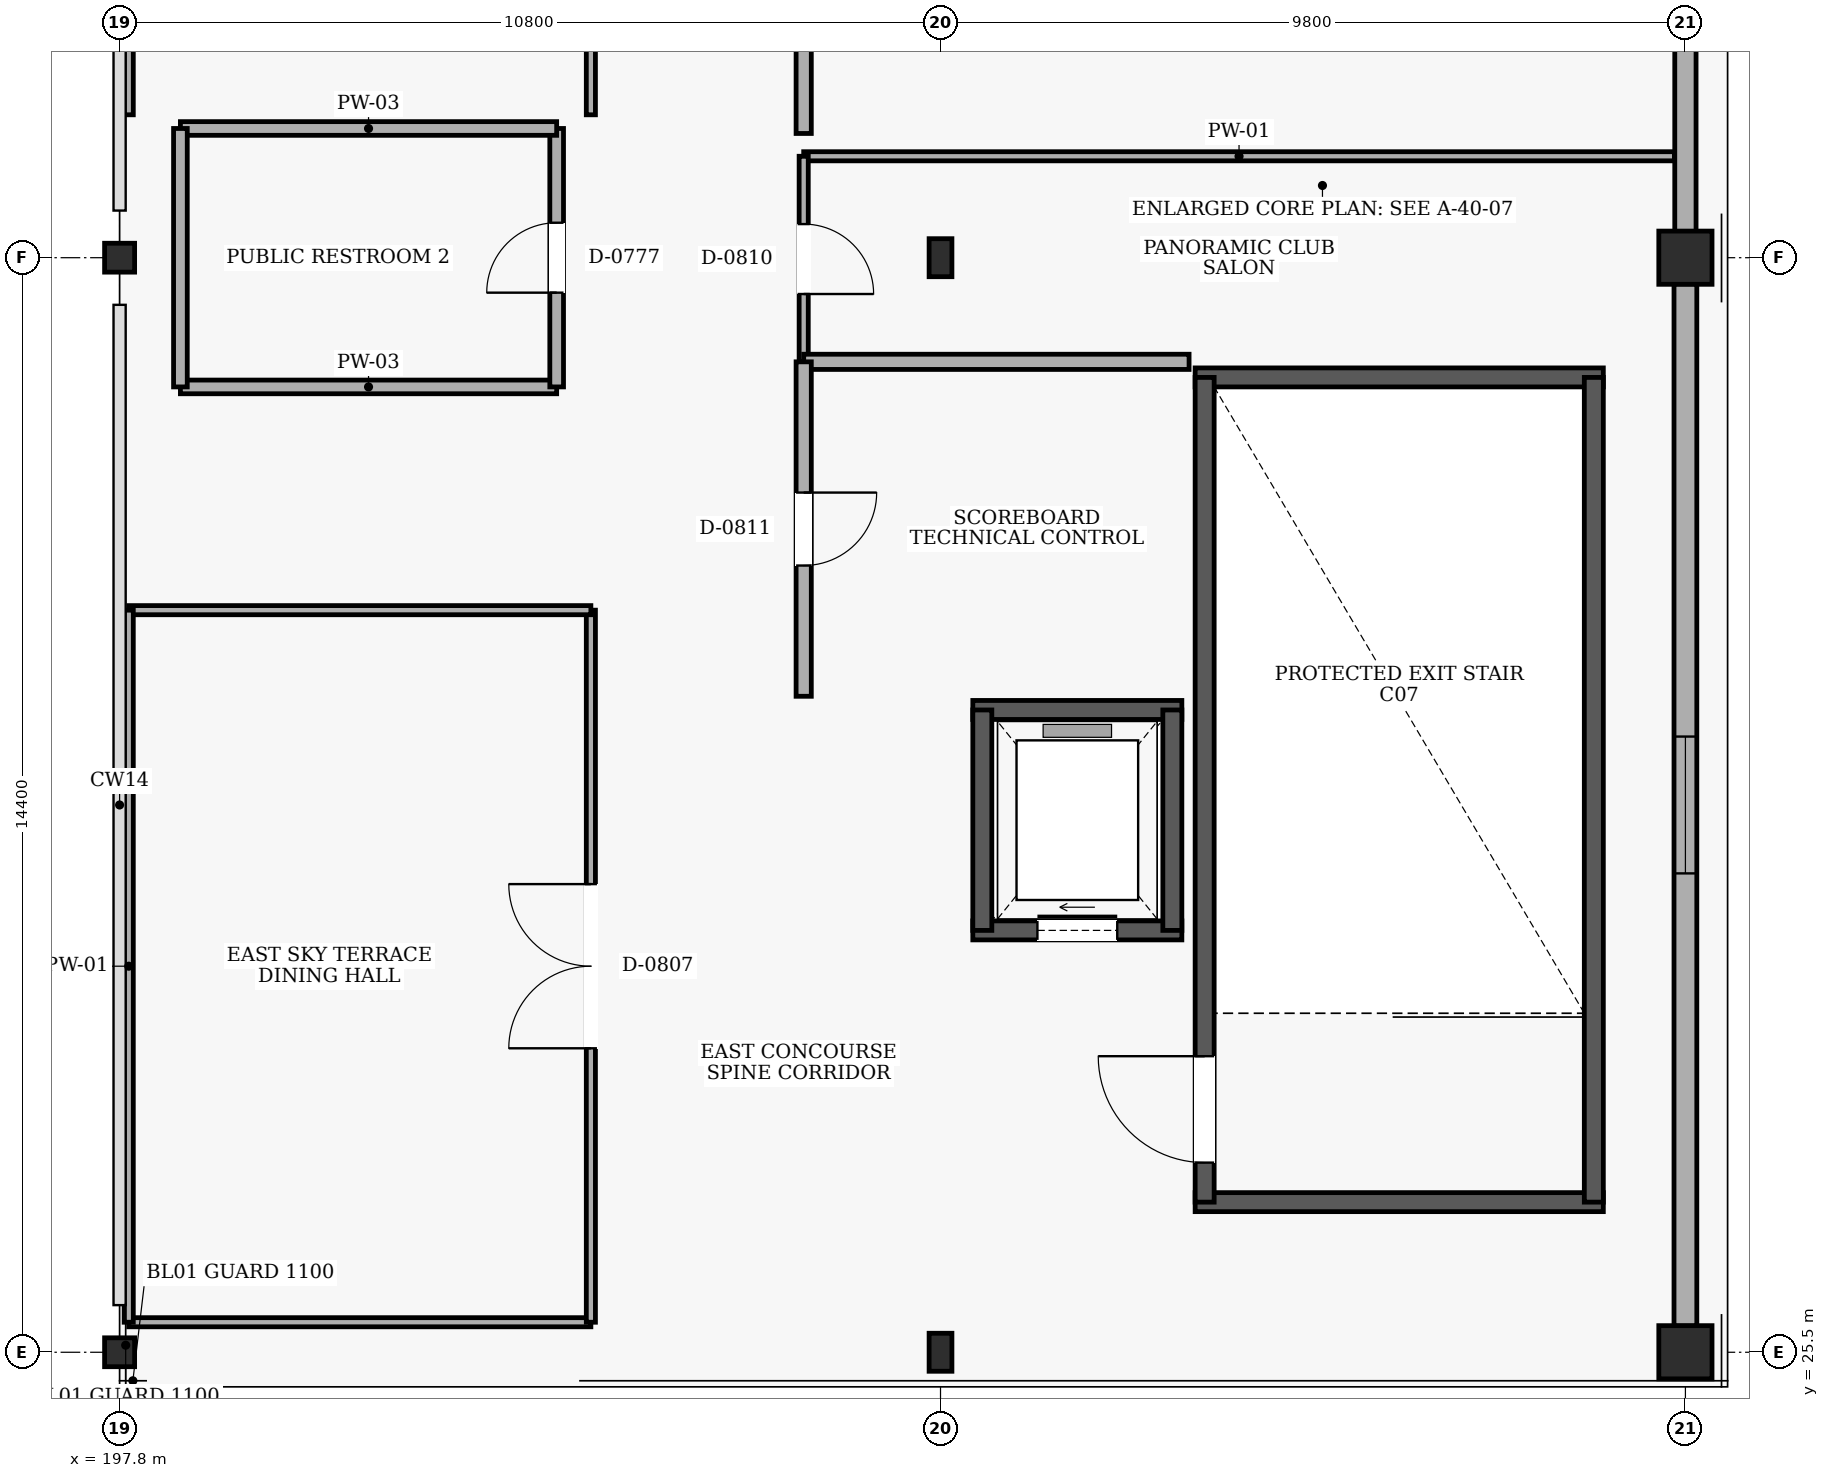
"""IFC4 building model, lengths in metres.
Left out: names, types, materials, properties, quantities, classifications, styles, units other than length and angle.
Written with IfcOpenShell. Run it as: python <this file> out.ifc"""

import sys

from ifc_helpers import new_model, si_unit, direction, frame, frame_2d, origin, origin_2d, place, context, subcontext, project, spatial, rectangle, i_section, extrude, element, fill, save


model = new_model("IFC4")
c1 = context("Model", 3, precision=1e-05, world=origin(), true_north=direction((0.0, 1.0)))
c2 = subcontext(c1, "Body", "Model", "MODEL_VIEW")
j1 = project(units=[si_unit("LENGTHUNIT", "METRE"), si_unit("PLANEANGLEUNIT", "RADIAN")], contexts=[c1])
p1 = place(None, origin())
s1 = spatial("IfcSite", under=j1, at=p1, CompositionType="ELEMENT")
p2 = place(p1, origin())
s2 = spatial("IfcBuilding", under=s1, at=p2, CompositionType="ELEMENT")
p3 = place(p2, frame((0.0, 0.0, 24.6)))
s3 = spatial("IfcBuildingStorey", under=s2, at=p3, CompositionType="ELEMENT", Elevation=24.6)
for number, where, z_axis, x_axis in (
    (1, (197.8, 25.5, 0.0), (0.0, 0.0, 1.0), (1.0, 0.0, 0.0)),
    (2, (197.8, 39.9, 0.0), (0.0, 0.0, 1.0), (1.0, 0.0, 0.0)),
):
    element("IfcColumn", number, at=place(p3, frame(where, z_axis=z_axis, x_axis=x_axis)), inside=s3, PredefinedType="COLUMN", context=c2, shape_type="SweptSolid", body=[
        extrude(i_section(OverallWidth=0.395, OverallDepth=0.38, WebThickness=0.019, FlangeThickness=0.03, at=origin_2d()), origin(), (0.0, 0.0, 1.0), 4.8),
    ])
for number, where, z_axis, x_axis in (
    (3, (208.6, 25.5, 0.0), (0.0, 0.0, 1.0), (1.0, 0.0, 0.0)),
    (4, (208.6, 39.9, 0.0), (0.0, 0.0, 1.0), (1.0, 0.0, 0.0)),
):
    element("IfcColumn", number, at=place(p3, frame(where, z_axis=z_axis, x_axis=x_axis)), inside=s3, PredefinedType="COLUMN", context=c2, shape_type="SweptSolid", body=[
        extrude(i_section(OverallWidth=0.3, OverallDepth=0.5, WebThickness=0.014, FlangeThickness=0.028, at=origin_2d()), origin(), (0.0, 0.0, 1.0), 4.8),
    ])
for number, where, z_axis, x_axis in (
    (5, (218.4, 25.5, 0.0), (0.0, 0.0, 1.0), (1.0, 0.0, 0.0)),
    (6, (218.4, 39.9, 0.0), (0.0, 0.0, 1.0), (1.0, 0.0, 0.0)),
):
    element("IfcColumn", number, at=place(p3, frame(where, z_axis=z_axis, x_axis=x_axis)), inside=s3, PredefinedType="COLUMN", context=c2, shape_type="SweptSolid", body=[
        extrude(rectangle(XDim=0.7, YDim=0.7, at=origin_2d()), origin(), (0.0, 0.0, 1.0), 4.8),
    ])
p4 = place(p3, frame((218.4, 46.755, 0.0), z_axis=(0.0, 0.0, 1.0), x_axis=(0.0, -1.0, 0.0)))
e7 = element("IfcWall", 7, at=p4, inside=s3, PredefinedType="SOLIDWALL", context=c2, shape_type="SweptSolid", body=[
    extrude(rectangle(XDim=6.51, YDim=0.28, at=frame_2d((3.255, 0.0))), origin(), (0.0, 0.0, 1.0), 3.88),
])
p5 = place(p4, frame((2.455, 0.0, 0.9)))
e8 = element("IfcOpeningElement", 8, at=p5, cuts=e7, PredefinedType="OPENING", context=c2, shape_type="SweptSolid", body=[
    extrude(rectangle(XDim=1.6, YDim=1.5, at=frame_2d((0.8, 0.75))), frame((0.0, 0.15, 0.0), z_axis=(0.0, -1.0, 0.0), x_axis=(1.0, 0.0, 0.0)), (0.0, 0.0, 1.0), 0.3),
])
p6 = place(p3, frame((218.4, 39.555, 0.0), z_axis=(0.0, 0.0, 1.0), x_axis=(0.0, -1.0, 0.0)))
e9 = element("IfcWall", 9, at=p6, inside=s3, PredefinedType="SOLIDWALL", context=c2, shape_type="SweptSolid", body=[
    extrude(rectangle(XDim=13.71, YDim=0.3, at=frame_2d((6.855, 0.0))), origin(), (0.0, 0.0, 1.0), 3.58),
])
p7 = place(p6, frame((5.955, 0.0, 0.9)))
e10 = element("IfcOpeningElement", 10, at=p7, cuts=e9, PredefinedType="OPENING", context=c2, shape_type="SweptSolid", body=[
    extrude(rectangle(XDim=1.8, YDim=1.5, at=frame_2d((0.9, 0.75))), frame((0.0, 0.16, 0.0), z_axis=(0.0, -1.0, 0.0), x_axis=(1.0, 0.0, 0.0)), (0.0, 0.0, 1.0), 0.32),
])
for number, where, z_axis, x_axis in (
    (11, (211.95, 27.475, 0.0), (0.0, 0.0, 1.0), (1.0, 0.0, 0.0)),
    (12, (217.32, 38.325, 0.0), (0.0, 0.0, 1.0), (-1.0, 0.0, 0.0)),
):
    element("IfcWall", number, at=place(p3, frame(where, z_axis=z_axis, x_axis=x_axis)), inside=s3, PredefinedType="SHEAR", context=c2, shape_type="SweptSolid", body=[
        extrude(rectangle(XDim=5.37, YDim=0.25, at=frame_2d((2.685, 0.0))), origin(), (0.0, 0.0, 1.0), 4.5),
    ])
p8 = place(p3, frame((212.075, 27.475, 0.0), z_axis=(0.0, 0.0, 1.0), x_axis=(0.0, 1.0, 0.0)))
e13 = element("IfcWall", 13, at=p8, inside=s3, PredefinedType="SHEAR", context=c2, shape_type="SweptSolid", body=[
    extrude(rectangle(XDim=10.85, YDim=0.25, at=frame_2d((5.425, 0.0))), origin(), (0.0, 0.0, 1.0), 4.5),
])
p9 = place(p8, frame((0.52, 0.0, 0.0)))
e14 = element("IfcOpeningElement", 14, at=p9, cuts=e13, PredefinedType="OPENING", context=c2, shape_type="SweptSolid", body=[
    extrude(rectangle(XDim=1.4, YDim=2.15, at=frame_2d((0.7, 1.075))), frame((0.0, 0.135, 0.0), z_axis=(0.0, -1.0, 0.0), x_axis=(1.0, 0.0, 0.0)), (0.0, 0.0, 1.0), 0.27),
])
p10 = place(p3, frame((217.195, 27.475, 0.0), z_axis=(0.0, 0.0, 1.0), x_axis=(0.0, 1.0, 0.0)))
e15 = element("IfcWall", 15, at=p10, inside=s3, PredefinedType="SHEAR", context=c2, shape_type="SweptSolid", body=[
    extrude(rectangle(XDim=10.85, YDim=0.25, at=frame_2d((5.425, 0.0))), origin(), (0.0, 0.0, 1.0), 4.5),
])
p11 = place(p3, frame((209.025, 31.05, 0.0), z_axis=(0.0, 0.0, 1.0), x_axis=(1.0, 0.0, 0.0)))
e16 = element("IfcWall", 16, at=p11, inside=s3, PredefinedType="SHEAR", context=c2, shape_type="SweptSolid", body=[
    extrude(rectangle(XDim=2.75, YDim=0.25, at=frame_2d((1.375, 0.0))), origin(), (0.0, 0.0, 1.0), 4.5),
])
p12 = place(p11, frame((0.85, 0.0, 0.0)))
e17 = element("IfcOpeningElement", 17, at=p12, cuts=e16, PredefinedType="OPENING", context=c2, shape_type="SweptSolid", body=[
    extrude(rectangle(XDim=1.05, YDim=2.15, at=frame_2d((0.525, 1.075))), frame((0.0, 0.135, 0.0), z_axis=(0.0, -1.0, 0.0), x_axis=(1.0, 0.0, 0.0)), (0.0, 0.0, 1.0), 0.27),
])
p13 = place(p3, frame((211.775, 33.95, 0.0), z_axis=(0.0, 0.0, 1.0), x_axis=(-1.0, 0.0, 0.0)))
e18 = element("IfcWall", 18, at=p13, inside=s3, PredefinedType="SHEAR", context=c2, shape_type="SweptSolid", body=[
    extrude(rectangle(XDim=2.75, YDim=0.25, at=frame_2d((1.375, 0.0))), origin(), (0.0, 0.0, 1.0), 4.5),
])
for number, where, z_axis, x_axis in (
    (19, (209.15, 33.95, 0.0), (0.0, 0.0, 1.0), (0.0, -1.0, 0.0)),
    (20, (211.65, 31.05, 0.0), (0.0, 0.0, 1.0), (0.0, 1.0, 0.0)),
):
    element("IfcWall", number, at=place(p3, frame(where, z_axis=z_axis, x_axis=x_axis)), inside=s3, PredefinedType="SHEAR", context=c2, shape_type="SweptSolid", body=[
        extrude(rectangle(XDim=2.9, YDim=0.25, at=frame_2d((1.45, 0.0))), origin(), (0.0, 0.0, 1.0), 4.5),
    ])
p14 = place(p3, frame((198.6, 38.2, 0.0), z_axis=(0.0, 0.0, 1.0), x_axis=(1.0, 0.0, 0.0)))
e21 = element("IfcWall", 21, at=p14, inside=s3, PredefinedType="PARTITIONING", context=c2, shape_type="SweptSolid", body=[
    extrude(rectangle(XDim=4.95, YDim=0.18, at=frame_2d((2.475, 0.0))), origin(), (0.0, 0.0, 1.0), 4.5),
])
p15 = place(p3, frame((203.55, 38.2, 0.0), z_axis=(0.0, 0.0, 1.0), x_axis=(0.0, 1.0, 0.0)))
e22 = element("IfcWall", 22, at=p15, inside=s3, PredefinedType="PARTITIONING", context=c2, shape_type="SweptSolid", body=[
    extrude(rectangle(XDim=3.4, YDim=0.18, at=frame_2d((1.7, 0.0))), origin(), (0.0, 0.0, 1.0), 4.5),
])
p16 = place(p15, frame((1.24, 0.0, 0.0)))
e23 = element("IfcOpeningElement", 23, at=p16, cuts=e22, PredefinedType="OPENING", context=c2, shape_type="SweptSolid", body=[
    extrude(rectangle(XDim=0.92, YDim=2.1, at=frame_2d((0.46, 1.05))), frame((0.0, 0.1, 0.0), z_axis=(0.0, -1.0, 0.0), x_axis=(1.0, 0.0, 0.0)), (0.0, 0.0, 1.0), 0.2),
])
p17 = place(p3, frame((203.55, 41.6, 0.0), z_axis=(0.0, 0.0, 1.0), x_axis=(-1.0, 0.0, 0.0)))
e24 = element("IfcWall", 24, at=p17, inside=s3, PredefinedType="PARTITIONING", context=c2, shape_type="SweptSolid", body=[
    extrude(rectangle(XDim=4.95, YDim=0.18, at=frame_2d((2.475, 0.0))), origin(), (0.0, 0.0, 1.0), 4.5),
])
p18 = place(p3, frame((198.6, 41.6, 0.0), z_axis=(0.0, 0.0, 1.0), x_axis=(0.0, -1.0, 0.0)))
e25 = element("IfcWall", 25, at=p18, inside=s3, PredefinedType="PARTITIONING", context=c2, shape_type="SweptSolid", body=[
    extrude(rectangle(XDim=3.4, YDim=0.18, at=frame_2d((1.7, 0.0))), origin(), (0.0, 0.0, 1.0), 4.5),
])
p19 = place(p3, frame((197.92, 25.895, 0.0), z_axis=(0.0, 0.0, 1.0), x_axis=(1.0, 0.0, 0.0)))
e26 = element("IfcWall", 26, at=p19, inside=s3, PredefinedType="PARTITIONING", context=c2, shape_type="SweptSolid", body=[
    extrude(rectangle(XDim=6.08, YDim=0.12, at=frame_2d((3.04, 0.0))), origin(), (0.0, 0.0, 1.0), 3.78),
])
p20 = place(p3, frame((204.0, 25.895, 0.0), z_axis=(0.0, 0.0, 1.0), x_axis=(0.0, 1.0, 0.0)))
e27 = element("IfcWall", 27, at=p20, inside=s3, PredefinedType="PARTITIONING", context=c2, shape_type="SweptSolid", body=[
    extrude(rectangle(XDim=9.368, YDim=0.12, at=frame_2d((4.684, 0.0))), origin(), (0.0, 0.0, 1.0), 4.5),
])
p21 = place(p20, frame((3.604, 0.0, 0.0)))
e28 = element("IfcOpeningElement", 28, at=p21, cuts=e27, PredefinedType="OPENING", context=c2, shape_type="SweptSolid", body=[
    extrude(rectangle(XDim=2.16, YDim=2.35, at=frame_2d((1.08, 1.175))), frame((0.0, 0.07, 0.0), z_axis=(0.0, -1.0, 0.0), x_axis=(1.0, 0.0, 0.0)), (0.0, 0.0, 1.0), 0.14),
])
p22 = place(p3, frame((204.0, 35.263, 0.0), z_axis=(0.0, 0.0, 1.0), x_axis=(-1.0, 0.0, 0.0)))
e29 = element("IfcWall", 29, at=p22, inside=s3, PredefinedType="PARTITIONING", context=c2, shape_type="SweptSolid", body=[
    extrude(rectangle(XDim=6.08, YDim=0.12, at=frame_2d((3.04, 0.0))), origin(), (0.0, 0.0, 1.0), 4.5),
])
p23 = place(p3, frame((197.92, 35.263, 0.0), z_axis=(0.0, 0.0, 1.0), x_axis=(0.0, -1.0, 0.0)))
e30 = element("IfcWall", 30, at=p23, inside=s3, PredefinedType="PARTITIONING", context=c2, shape_type="SweptSolid", body=[
    extrude(rectangle(XDim=9.368, YDim=0.12, at=frame_2d((4.684, 0.0))), origin(), (0.0, 0.0, 1.0), 3.58),
])
p24 = place(p3, frame((204.0, 41.78, 0.0), z_axis=(0.0, 0.0, 1.0), x_axis=(0.0, 1.0, 0.0)))
e31 = element("IfcWall", 31, at=p24, inside=s3, PredefinedType="PARTITIONING", context=c2, shape_type="SweptSolid", body=[
    extrude(rectangle(XDim=2.866, YDim=0.12, at=frame_2d((1.433, 0.0))), origin(), (0.0, 0.0, 1.0), 4.5),
])
p25 = place(p24, frame((0.953, 0.0, 0.0)))
e32 = element("IfcOpeningElement", 32, at=p25, cuts=e31, PredefinedType="OPENING", context=c2, shape_type="SweptSolid", body=[
    extrude(rectangle(XDim=0.96, YDim=2.1, at=frame_2d((0.48, 1.05))), frame((0.0, 0.07, 0.0), z_axis=(0.0, -1.0, 0.0), x_axis=(1.0, 0.0, 0.0)), (0.0, 0.0, 1.0), 0.14),
])
p26 = place(p3, frame((197.92, 44.646, 0.0), z_axis=(0.0, 0.0, 1.0), x_axis=(0.0, -1.0, 0.0)))
e33 = element("IfcWall", 33, at=p26, inside=s3, PredefinedType="PARTITIONING", context=c2, shape_type="SweptSolid", body=[
    extrude(rectangle(XDim=2.866, YDim=0.12, at=frame_2d((1.433, 0.0))), origin(), (0.0, 0.0, 1.0), 3.58),
])
p27 = place(p3, frame((218.255, 41.234, 0.0), z_axis=(0.0, 0.0, 1.0), x_axis=(-1.0, 0.0, 0.0)))
e34 = element("IfcWall", 34, at=p27, inside=s3, PredefinedType="PARTITIONING", context=c2, shape_type="SweptSolid", body=[
    extrude(rectangle(XDim=11.455, YDim=0.12, at=frame_2d((5.728, 0.0))), origin(), (0.0, 0.0, 1.0), 4.5),
])
p28 = place(p3, frame((206.8, 41.234, 0.0), z_axis=(0.0, 0.0, 1.0), x_axis=(0.0, -1.0, 0.0)))
e35 = element("IfcWall", 35, at=p28, inside=s3, PredefinedType="PARTITIONING", context=c2, shape_type="SweptSolid", body=[
    extrude(rectangle(XDim=2.704, YDim=0.12, at=frame_2d((1.352, 0.0))), origin(), (0.0, 0.0, 1.0), 4.5),
])
p29 = place(p28, frame((0.892, 0.0, 0.0)))
e36 = element("IfcOpeningElement", 36, at=p29, cuts=e35, PredefinedType="OPENING", context=c2, shape_type="SweptSolid", body=[
    extrude(rectangle(XDim=0.92, YDim=2.1, at=frame_2d((0.46, 1.05))), frame((0.0, 0.07, 0.0), z_axis=(0.0, -1.0, 0.0), x_axis=(1.0, 0.0, 0.0)), (0.0, 0.0, 1.0), 0.14),
])
p30 = place(p3, frame((211.87, 38.53, 0.0), z_axis=(0.0, 0.0, 1.0), x_axis=(-1.0, 0.0, 0.0)))
e37 = element("IfcWall", 37, at=p30, inside=s3, PredefinedType="PARTITIONING", context=c2, shape_type="SweptSolid", body=[
    extrude(rectangle(XDim=5.07, YDim=0.2, at=frame_2d((2.535, 0.0))), origin(), (0.0, 0.0, 1.0), 4.5),
])
p31 = place(p3, frame((206.8, 38.53, 0.0), z_axis=(0.0, 0.0, 1.0), x_axis=(0.0, -1.0, 0.0)))
e38 = element("IfcWall", 38, at=p31, inside=s3, PredefinedType="PARTITIONING", context=c2, shape_type="SweptSolid", body=[
    extrude(rectangle(XDim=4.4, YDim=0.2, at=frame_2d((2.2, 0.0))), origin(), (0.0, 0.0, 1.0), 4.5),
])
p32 = place(p31, frame((1.72, 0.0, 0.0)))
e39 = element("IfcOpeningElement", 39, at=p32, cuts=e38, PredefinedType="OPENING", context=c2, shape_type="SweptSolid", body=[
    extrude(rectangle(XDim=0.96, YDim=2.1, at=frame_2d((0.48, 1.05))), frame((0.0, 0.11, 0.0), z_axis=(0.0, -1.0, 0.0), x_axis=(1.0, 0.0, 0.0)), (0.0, 0.0, 1.0), 0.22),
])
p33 = place(p3, frame((206.8, 54.03, 0.0), z_axis=(0.0, 0.0, 1.0), x_axis=(0.0, -1.0, 0.0)))
e40 = element("IfcWall", 40, at=p33, inside=s3, PredefinedType="PARTITIONING", context=c2, shape_type="SweptSolid", body=[
    extrude(rectangle(XDim=12.496, YDim=0.2, at=frame_2d((6.248, 0.0))), origin(), (0.0, 0.0, 1.0), 4.5),
])
p34 = place(p33, frame((4.884, 0.0, 0.0)))
e41 = element("IfcOpeningElement", 41, at=p34, cuts=e40, PredefinedType="OPENING", context=c2, shape_type="SweptSolid", body=[
    extrude(rectangle(XDim=1.0, YDim=2.1, at=frame_2d((0.5, 1.05))), frame((0.0, 0.11, 0.0), z_axis=(0.0, -1.0, 0.0), x_axis=(1.0, 0.0, 0.0)), (0.0, 0.0, 1.0), 0.22),
])
p35 = place(p7, origin())
e42 = element("IfcWindow", 42, at=p35, inside=s3, PartitioningType="SINGLE_PANEL", PredefinedType="WINDOW", context=c2, shape_type="SweptSolid", body=[
    extrude(rectangle(XDim=1.8, YDim=1.5, at=frame_2d((0.9, 0.75))), frame((0.0, 0.03, 0.0), z_axis=(0.0, -1.0, 0.0), x_axis=(1.0, 0.0, 0.0)), (0.0, 0.0, 1.0), 0.06),
])
fill(e10, e42)
p36 = place(p9, frame((1.4, 0.0, 0.0), z_axis=(0.0, 0.0, 1.0), x_axis=(-1.0, 0.0, 0.0)))
e43 = element("IfcDoor", 43, at=p36, inside=s3, OperationType="SINGLE_SWING_LEFT", PredefinedType="DOOR", context=c2, shape_type="SweptSolid", body=[
    extrude(rectangle(XDim=1.4, YDim=2.15, at=frame_2d((0.7, 1.075))), frame((0.0, 0.025, 0.0), z_axis=(0.0, -1.0, 0.0), x_axis=(1.0, 0.0, 0.0)), (0.0, 0.0, 1.0), 0.05),
])
fill(e14, e43)
p37 = place(p12, origin())
e44 = element("IfcDoor", 44, at=p37, inside=s3, OperationType="SLIDING_TO_RIGHT", PredefinedType="DOOR", context=c2, shape_type="SweptSolid", body=[
    extrude(rectangle(XDim=1.05, YDim=2.15, at=frame_2d((0.525, 1.075))), frame((0.0, 0.025, 0.0), z_axis=(0.0, -1.0, 0.0), x_axis=(1.0, 0.0, 0.0)), (0.0, 0.0, 1.0), 0.05),
])
fill(e17, e44)
p38 = place(p16, origin())
e45 = element("IfcDoor", 45, at=p38, inside=s3, OperationType="SINGLE_SWING_LEFT", PredefinedType="DOOR", context=c2, shape_type="SweptSolid", body=[
    extrude(rectangle(XDim=0.92, YDim=2.1, at=frame_2d((0.46, 1.05))), frame((0.0, 0.025, 0.0), z_axis=(0.0, -1.0, 0.0), x_axis=(1.0, 0.0, 0.0)), (0.0, 0.0, 1.0), 0.05),
])
fill(e23, e45)
p39 = place(p21, origin())
e46 = element("IfcDoor", 46, at=p39, inside=s3, OperationType="DOUBLE_DOOR_SINGLE_SWING", PredefinedType="DOOR", context=c2, shape_type="SweptSolid", body=[
    extrude(rectangle(XDim=2.16, YDim=2.35, at=frame_2d((1.08, 1.175))), frame((0.0, 0.025, 0.0), z_axis=(0.0, -1.0, 0.0), x_axis=(1.0, 0.0, 0.0)), (0.0, 0.0, 1.0), 0.05),
])
fill(e28, e46)
p40 = place(p29, origin())
e47 = element("IfcDoor", 47, at=p40, inside=s3, OperationType="SINGLE_SWING_RIGHT", PredefinedType="DOOR", context=c2, shape_type="SweptSolid", body=[
    extrude(rectangle(XDim=0.92, YDim=2.1, at=frame_2d((0.46, 1.05))), frame((0.0, 0.025, 0.0), z_axis=(0.0, -1.0, 0.0), x_axis=(1.0, 0.0, 0.0)), (0.0, 0.0, 1.0), 0.05),
])
fill(e36, e47)
p41 = place(p32, origin())
e48 = element("IfcDoor", 48, at=p41, inside=s3, OperationType="SINGLE_SWING_LEFT", PredefinedType="DOOR", context=c2, shape_type="SweptSolid", body=[
    extrude(rectangle(XDim=0.96, YDim=2.1, at=frame_2d((0.48, 1.05))), frame((0.0, 0.025, 0.0), z_axis=(0.0, -1.0, 0.0), x_axis=(1.0, 0.0, 0.0)), (0.0, 0.0, 1.0), 0.05),
])
fill(e39, e48)
save(model, sys.argv[1])
